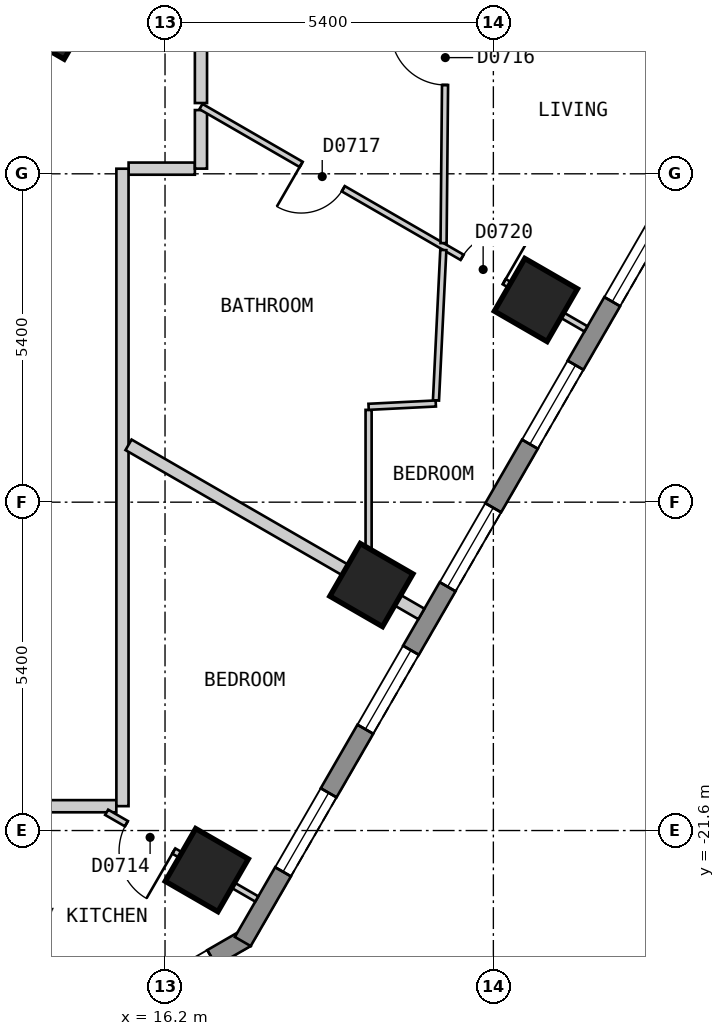
"""IFC4 building model, lengths in metres.
Left out: names, types, materials, properties, quantities, classifications, styles, units other than length and angle.
Written with IfcOpenShell. Run it as: python <this file> out.ifc"""

import sys

from ifc_helpers import new_model, si_unit, direction, frame, frame_2d, origin, origin_2d, place, context, subcontext, project, spatial, polyline, rectangle, outline, extrude, element, fill, save


model = new_model("IFC4")
c1 = context("Model", 3, precision=1e-05, world=origin(), true_north=direction((0.0, 1.0)))
c2 = subcontext(c1, "Body", "Model", "MODEL_VIEW")
j1 = project(units=[si_unit("LENGTHUNIT", "METRE"), si_unit("PLANEANGLEUNIT", "RADIAN")], contexts=[c1])
p1 = place(None, origin())
s1 = spatial("IfcSite", under=j1, at=p1, CompositionType="ELEMENT")
p2 = place(p1, origin())
s2 = spatial("IfcBuilding", under=s1, at=p2, CompositionType="ELEMENT")
p3 = place(p2, frame((0.0, 0.0, 93.0)))
s3 = spatial("IfcBuildingStorey", under=s2, at=p3, CompositionType="ELEMENT", Elevation=93.0)
for number, where, z_axis, x_axis in (
    (1, (16.887, -22.251, 0.0), (0.0, 0.0, 1.0), (0.5, 0.866, 0.0)),
    (2, (19.594, -17.563, 0.0), (0.0, 0.0, 1.0), (0.5, 0.866, 0.0)),
    (3, (22.3, -12.875, 0.0), (0.0, 0.0, 1.0), (0.5, 0.866, 0.0)),
):
    element("IfcColumn", number, at=place(p3, frame(where, z_axis=z_axis, x_axis=x_axis)), inside=s3, PredefinedType="COLUMN", context=c2, shape_type="SweptSolid", body=[
        extrude(rectangle(XDim=1.0, YDim=1.0, at=origin_2d()), origin(), (0.0, 0.0, 1.0), 3.0),
    ])
p4 = place(p3, frame((14.376, -8.3, 0.0), z_axis=(0.0, 0.0, 1.0), x_axis=(0.5, 0.866025403784, 0.0)))
e4 = element("IfcColumn", 4, at=p4, inside=s3, PredefinedType="COLUMN", context=c2, shape_type="SweptSolid", body=[
    extrude(rectangle(XDim=0.9, YDim=0.9, at=origin_2d()), origin(), (0.0, 0.0, 1.0), 3.0),
])
p5 = place(p3, frame((13.204, -25.87, 0.0), z_axis=(0.0, 0.0, 1.0), x_axis=(0.866010750942, 0.50002537861, 0.0)))
e5 = element("IfcWall", 5, at=p5, inside=s3, PredefinedType="SOLIDWALL", context=c2, shape_type="SweptSolid", body=[
    extrude(outline(polyline([(0.0, -0.15), (5.0, -0.15), (4.919, 0.15), (0.08, 0.15), (0.0, -0.15)])), origin(), (0.0, 0.0, 1.0), 2.7),
])
p6 = place(p5, frame((0.65, 0.0, 0.15)))
e6 = element("IfcOpeningElement", 6, at=p6, cuts=e5, PredefinedType="OPENING", context=c2, shape_type="SweptSolid", body=[
    extrude(rectangle(XDim=1.2, YDim=2.1, at=frame_2d((0.6, 1.05))), frame((0.0, 0.16, 0.0), z_axis=(0.0, -1.0, 0.0), x_axis=(1.0, 0.0, 0.0)), (0.0, 0.0, 1.0), 0.32),
])
p7 = place(p5, frame((3.149, 0.0, 0.15)))
e7 = element("IfcOpeningElement", 7, at=p7, cuts=e5, PredefinedType="OPENING", context=c2, shape_type="SweptSolid", body=[
    extrude(rectangle(XDim=1.2, YDim=2.1, at=frame_2d((0.6, 1.05))), frame((0.0, 0.16, 0.0), z_axis=(0.0, -1.0, 0.0), x_axis=(1.0, 0.0, 0.0)), (0.0, 0.0, 1.0), 0.32),
])
p8 = place(p3, frame((17.479, -23.425, 0.0), z_axis=(0.0, 0.0, 1.0), x_axis=(0.500035407905, 0.866004960056, 0.0)))
e8 = element("IfcWall", 8, at=p8, inside=s3, PredefinedType="SOLIDWALL", context=c2, shape_type="SweptSolid", body=[
    extrude(outline(polyline([(0.0, -0.15), (23.094, -0.15), (23.014, 0.15), (0.08, 0.15), (0.0, -0.15)])), origin(), (0.0, 0.0, 1.0), 2.7),
])
p9 = place(p8, frame((1.324, 0.0, 0.15)))
e9 = element("IfcOpeningElement", 9, at=p9, cuts=e8, PredefinedType="OPENING", context=c2, shape_type="SweptSolid", body=[
    extrude(rectangle(XDim=1.5, YDim=2.1, at=frame_2d((0.75, 1.05))), frame((0.0, 0.16, 0.0), z_axis=(0.0, -1.0, 0.0), x_axis=(1.0, 0.0, 0.0)), (0.0, 0.0, 1.0), 0.32),
])
p10 = place(p8, frame((4.031, 0.0, 0.15)))
e10 = element("IfcOpeningElement", 10, at=p10, cuts=e8, PredefinedType="OPENING", context=c2, shape_type="SweptSolid", body=[
    extrude(rectangle(XDim=1.5, YDim=2.1, at=frame_2d((0.75, 1.05))), frame((0.0, 0.16, 0.0), z_axis=(0.0, -1.0, 0.0), x_axis=(1.0, 0.0, 0.0)), (0.0, 0.0, 1.0), 0.32),
])
p11 = place(p8, frame((6.737, 0.0, 0.15)))
e11 = element("IfcOpeningElement", 11, at=p11, cuts=e8, PredefinedType="OPENING", context=c2, shape_type="SweptSolid", body=[
    extrude(rectangle(XDim=1.5, YDim=2.1, at=frame_2d((0.75, 1.05))), frame((0.0, 0.16, 0.0), z_axis=(0.0, -1.0, 0.0), x_axis=(1.0, 0.0, 0.0)), (0.0, 0.0, 1.0), 0.32),
])
p12 = place(p8, frame((9.444, 0.0, 0.15)))
e12 = element("IfcOpeningElement", 12, at=p12, cuts=e8, PredefinedType="OPENING", context=c2, shape_type="SweptSolid", body=[
    extrude(rectangle(XDim=1.5, YDim=2.1, at=frame_2d((0.75, 1.05))), frame((0.0, 0.16, 0.0), z_axis=(0.0, -1.0, 0.0), x_axis=(1.0, 0.0, 0.0)), (0.0, 0.0, 1.0), 0.32),
])
p13 = place(p8, frame((12.151, 0.0, 0.15)))
e13 = element("IfcOpeningElement", 13, at=p13, cuts=e8, PredefinedType="OPENING", context=c2, shape_type="SweptSolid", body=[
    extrude(rectangle(XDim=1.5, YDim=2.1, at=frame_2d((0.75, 1.05))), frame((0.0, 0.16, 0.0), z_axis=(0.0, -1.0, 0.0), x_axis=(1.0, 0.0, 0.0)), (0.0, 0.0, 1.0), 0.32),
])
p14 = place(p8, frame((14.857, 0.0, 0.15)))
e14 = element("IfcOpeningElement", 14, at=p14, cuts=e8, PredefinedType="OPENING", context=c2, shape_type="SweptSolid", body=[
    extrude(rectangle(XDim=1.5, YDim=2.1, at=frame_2d((0.75, 1.05))), frame((0.0, 0.16, 0.0), z_axis=(0.0, -1.0, 0.0), x_axis=(1.0, 0.0, 0.0)), (0.0, 0.0, 1.0), 0.32),
])
p15 = place(p8, frame((17.564, 0.0, 0.15)))
e15 = element("IfcOpeningElement", 15, at=p15, cuts=e8, PredefinedType="OPENING", context=c2, shape_type="SweptSolid", body=[
    extrude(rectangle(XDim=1.5, YDim=2.1, at=frame_2d((0.75, 1.05))), frame((0.0, 0.16, 0.0), z_axis=(0.0, -1.0, 0.0), x_axis=(1.0, 0.0, 0.0)), (0.0, 0.0, 1.0), 0.32),
])
p16 = place(p8, frame((20.271, 0.0, 0.15)))
e16 = element("IfcOpeningElement", 16, at=p16, cuts=e8, PredefinedType="OPENING", context=c2, shape_type="SweptSolid", body=[
    extrude(rectangle(XDim=1.5, YDim=2.1, at=frame_2d((0.75, 1.05))), frame((0.0, 0.16, 0.0), z_axis=(0.0, -1.0, 0.0), x_axis=(1.0, 0.0, 0.0)), (0.0, 0.0, 1.0), 0.32),
])
p17 = place(p3, frame((16.791, -5.985, 0.0), z_axis=(0.0, 0.0, 1.0), x_axis=(0.0, -1.0, 0.0)))
e17 = element("IfcWall", 17, at=p17, inside=s3, PredefinedType="PARTITIONING", context=c2, shape_type="SweptSolid", body=[
    extrude(rectangle(XDim=3.651, YDim=0.2, at=frame_2d((1.825, 0.0))), origin(), (0.0, 0.0, 1.0), 2.7),
])
p18 = place(p17, frame((0.183, 0.0, 0.0)))
e18 = element("IfcOpeningElement", 18, at=p18, cuts=e17, PredefinedType="OPENING", context=c2, shape_type="SweptSolid", body=[
    extrude(rectangle(XDim=1.0, YDim=2.1, at=frame_2d((0.5, 1.05))), frame((0.0, 0.11, 0.0), z_axis=(0.0, -1.0, 0.0), x_axis=(1.0, 0.0, 0.0)), (0.0, 0.0, 1.0), 0.22),
])
p19 = place(p3, frame((15.601, -10.715, 0.0), z_axis=(0.0, 0.0, 1.0), x_axis=(1.0, 0.0, 0.0)))
e19 = element("IfcWall", 19, at=p19, inside=s3, PredefinedType="PARTITIONING", context=c2, shape_type="SweptSolid", body=[
    extrude(rectangle(XDim=1.09, YDim=0.2, at=frame_2d((0.545, 0.0))), origin(), (0.0, 0.0, 1.0), 2.7),
])
p20 = place(p3, frame((-15.499, -21.2, 0.0), z_axis=(0.0, 0.0, 1.0), x_axis=(1.0, 0.0, 0.0)))
e20 = element("IfcWall", 20, at=p20, inside=s3, PredefinedType="PARTITIONING", context=c2, shape_type="SweptSolid", body=[
    extrude(rectangle(XDim=30.898, YDim=0.2, at=frame_2d((15.449, 0.0))), origin(), (0.0, 0.0, 1.0), 2.7),
])
p21 = place(p20, frame((9.977, 0.0, 0.0)))
e21 = element("IfcOpeningElement", 21, at=p21, cuts=e20, PredefinedType="OPENING", context=c2, shape_type="SweptSolid", body=[
    extrude(rectangle(XDim=1.0, YDim=2.1, at=frame_2d((0.5, 1.05))), frame((0.0, 0.11, 0.0), z_axis=(0.0, -1.0, 0.0), x_axis=(1.0, 0.0, 0.0)), (0.0, 0.0, 1.0), 0.22),
])
p22 = place(p20, frame((25.046, 0.0, 0.0)))
e22 = element("IfcOpeningElement", 22, at=p22, cuts=e20, PredefinedType="OPENING", context=c2, shape_type="SweptSolid", body=[
    extrude(rectangle(XDim=1.0, YDim=2.1, at=frame_2d((0.5, 1.05))), frame((0.0, 0.11, 0.0), z_axis=(0.0, -1.0, 0.0), x_axis=(1.0, 0.0, 0.0)), (0.0, 0.0, 1.0), 0.22),
])
p23 = place(p3, frame((15.5, -21.199, 0.0), z_axis=(0.0, 0.0, 1.0), x_axis=(0.0, 1.0, 0.0)))
e23 = element("IfcWall", 23, at=p23, inside=s3, PredefinedType="PARTITIONING", context=c2, shape_type="SweptSolid", body=[
    extrude(rectangle(XDim=10.483, YDim=0.2, at=frame_2d((5.241, 0.0))), origin(), (0.0, 0.0, 1.0), 2.7),
])
p24 = place(p3, frame((16.791, -10.715, 0.0), z_axis=(0.0, 0.0, 1.0), x_axis=(0.0, 1.0, 0.0)))
e24 = element("IfcWall", 24, at=p24, inside=s3, PredefinedType="PARTITIONING", context=c2, shape_type="SweptSolid", body=[
    extrude(rectangle(XDim=0.963, YDim=0.2, at=frame_2d((0.481, 0.0))), origin(), (0.0, 0.0, 1.0), 2.7),
])
p25 = place(p3, frame((15.24, -21.3, 0.0), z_axis=(0.0, 0.0, 1.0), x_axis=(0.866090043625, -0.499888023795, 0.0)))
e25 = element("IfcWall", 25, at=p25, inside=s3, PredefinedType="PARTITIONING", context=c2, shape_type="SweptSolid", body=[
    extrude(rectangle(XDim=2.851, YDim=0.1, at=frame_2d((1.425, 0.0))), origin(), (0.0, 0.0, 1.0), 2.7),
])
p26 = place(p25, frame((0.375, 0.0, 0.0)))
e26 = element("IfcOpeningElement", 26, at=p26, cuts=e25, PredefinedType="OPENING", context=c2, shape_type="SweptSolid", body=[
    extrude(rectangle(XDim=0.9, YDim=2.1, at=frame_2d((0.45, 1.05))), frame((0.0, 0.06, 0.0), z_axis=(0.0, -1.0, 0.0), x_axis=(1.0, 0.0, 0.0)), (0.0, 0.0, 1.0), 0.12),
])
p27 = place(p3, frame((16.791, -9.694, 0.0), z_axis=(0.0, 0.0, 1.0), x_axis=(0.866013208994, -0.500021121402, 0.0)))
e27 = element("IfcWall", 27, at=p27, inside=s3, PredefinedType="PARTITIONING", context=c2, shape_type="SweptSolid", body=[
    extrude(rectangle(XDim=7.312, YDim=0.1, at=frame_2d((3.656, 0.0))), origin(), (0.0, 0.0, 1.0), 2.7),
])
p28 = place(p27, frame((1.903, 0.0, 0.0)))
e28 = element("IfcOpeningElement", 28, at=p28, cuts=e27, PredefinedType="OPENING", context=c2, shape_type="SweptSolid", body=[
    extrude(rectangle(XDim=0.8, YDim=2.1, at=frame_2d((0.4, 1.05))), frame((0.0, 0.06, 0.0), z_axis=(0.0, -1.0, 0.0), x_axis=(1.0, 0.0, 0.0)), (0.0, 0.0, 1.0), 0.12),
])
p29 = place(p27, frame((4.959, 0.0, 0.0)))
e29 = element("IfcOpeningElement", 29, at=p29, cuts=e27, PredefinedType="OPENING", context=c2, shape_type="SweptSolid", body=[
    extrude(rectangle(XDim=0.8, YDim=2.1, at=frame_2d((0.4, 1.05))), frame((0.0, 0.06, 0.0), z_axis=(0.0, -1.0, 0.0), x_axis=(1.0, 0.0, 0.0)), (0.0, 0.0, 1.0), 0.12),
])
p30 = place(p3, frame((20.656, -14.527, 0.0), z_axis=(0.0, 0.0, 1.0), x_axis=(0.048885629948, 0.998804382842, 0.0)))
e30 = element("IfcWall", 30, at=p30, inside=s3, PredefinedType="PARTITIONING", context=c2, shape_type="SweptSolid", body=[
    extrude(rectangle(XDim=2.477, YDim=0.1, at=frame_2d((1.239, 0.0))), origin(), (0.0, 0.0, 1.0), 2.7),
])
p31 = place(p3, frame((20.781, -11.94, 0.0), z_axis=(0.0, 0.0, 1.0), x_axis=(0.009329670416, 0.999956477678, 0.0)))
e31 = element("IfcWall", 31, at=p31, inside=s3, PredefinedType="PARTITIONING", context=c2, shape_type="SweptSolid", body=[
    extrude(rectangle(XDim=6.097, YDim=0.1, at=frame_2d((3.049, 0.0))), origin(), (0.0, 0.0, 1.0), 2.7),
])
p32 = place(p31, frame((2.601, 0.0, 0.0)))
e32 = element("IfcOpeningElement", 32, at=p32, cuts=e31, PredefinedType="OPENING", context=c2, shape_type="SweptSolid", body=[
    extrude(rectangle(XDim=0.9, YDim=2.1, at=frame_2d((0.45, 1.05))), frame((0.0, 0.06, 0.0), z_axis=(0.0, -1.0, 0.0), x_axis=(1.0, 0.0, 0.0)), (0.0, 0.0, 1.0), 0.12),
])
p33 = place(p3, frame((19.548, -17.421, 0.0), z_axis=(0.0, 0.0, 1.0), x_axis=(0.0, 1.0, 0.0)))
e33 = element("IfcWall", 33, at=p33, inside=s3, PredefinedType="PARTITIONING", context=c2, shape_type="SweptSolid", body=[
    extrude(rectangle(XDim=2.739, YDim=0.1, at=frame_2d((1.37, 0.0))), origin(), (0.0, 0.0, 1.0), 2.7),
])
p34 = place(p3, frame((19.548, -14.632, 0.0), z_axis=(0.0, 0.0, 1.0), x_axis=(0.998755638501, 0.049871580712, 0.0)))
e34 = element("IfcWall", 34, at=p34, inside=s3, PredefinedType="PARTITIONING", context=c2, shape_type="SweptSolid", body=[
    extrude(rectangle(XDim=1.106, YDim=0.1, at=frame_2d((0.553, 0.0))), origin(), (0.0, 0.0, 1.0), 2.7),
])
p35 = place(p3, frame((15.6, -15.257, 0.0), z_axis=(0.0, 0.0, 1.0), x_axis=(0.86598379672, -0.500072058625, 0.0)))
e35 = element("IfcWall", 35, at=p35, inside=s3, PredefinedType="PARTITIONING", context=c2, shape_type="SweptSolid", body=[
    extrude(rectangle(XDim=5.561, YDim=0.2, at=frame_2d((2.781, 0.0))), origin(), (0.0, 0.0, 1.0), 2.7),
])
p36 = place(p7, origin())
e36 = element("IfcWindow", 36, at=p36, inside=s3, PartitioningType="SINGLE_PANEL", PredefinedType="WINDOW", context=c2, shape_type="SweptSolid", body=[
    extrude(rectangle(XDim=1.2, YDim=2.1, at=frame_2d((0.6, 1.05))), frame((0.0, 0.03, 0.0), z_axis=(0.0, -1.0, 0.0), x_axis=(1.0, 0.0, 0.0)), (0.0, 0.0, 1.0), 0.06),
])
fill(e7, e36)
p37 = place(p9, origin())
e37 = element("IfcWindow", 37, at=p37, inside=s3, PartitioningType="SINGLE_PANEL", PredefinedType="WINDOW", context=c2, shape_type="SweptSolid", body=[
    extrude(rectangle(XDim=1.5, YDim=2.1, at=frame_2d((0.75, 1.05))), frame((0.0, 0.03, 0.0), z_axis=(0.0, -1.0, 0.0), x_axis=(1.0, 0.0, 0.0)), (0.0, 0.0, 1.0), 0.06),
])
fill(e9, e37)
p38 = place(p10, origin())
e38 = element("IfcWindow", 38, at=p38, inside=s3, PartitioningType="SINGLE_PANEL", PredefinedType="WINDOW", context=c2, shape_type="SweptSolid", body=[
    extrude(rectangle(XDim=1.5, YDim=2.1, at=frame_2d((0.75, 1.05))), frame((0.0, 0.03, 0.0), z_axis=(0.0, -1.0, 0.0), x_axis=(1.0, 0.0, 0.0)), (0.0, 0.0, 1.0), 0.06),
])
fill(e10, e38)
p39 = place(p11, origin())
e39 = element("IfcWindow", 39, at=p39, inside=s3, PartitioningType="SINGLE_PANEL", PredefinedType="WINDOW", context=c2, shape_type="SweptSolid", body=[
    extrude(rectangle(XDim=1.5, YDim=2.1, at=frame_2d((0.75, 1.05))), frame((0.0, 0.03, 0.0), z_axis=(0.0, -1.0, 0.0), x_axis=(1.0, 0.0, 0.0)), (0.0, 0.0, 1.0), 0.06),
])
fill(e11, e39)
p40 = place(p12, origin())
e40 = element("IfcWindow", 40, at=p40, inside=s3, PartitioningType="SINGLE_PANEL", PredefinedType="WINDOW", context=c2, shape_type="SweptSolid", body=[
    extrude(rectangle(XDim=1.5, YDim=2.1, at=frame_2d((0.75, 1.05))), frame((0.0, 0.03, 0.0), z_axis=(0.0, -1.0, 0.0), x_axis=(1.0, 0.0, 0.0)), (0.0, 0.0, 1.0), 0.06),
])
fill(e12, e40)
p41 = place(p13, origin())
e41 = element("IfcWindow", 41, at=p41, inside=s3, PartitioningType="SINGLE_PANEL", PredefinedType="WINDOW", context=c2, shape_type="SweptSolid", body=[
    extrude(rectangle(XDim=1.5, YDim=2.1, at=frame_2d((0.75, 1.05))), frame((0.0, 0.03, 0.0), z_axis=(0.0, -1.0, 0.0), x_axis=(1.0, 0.0, 0.0)), (0.0, 0.0, 1.0), 0.06),
])
fill(e13, e41)
p42 = place(p26, origin())
e42 = element("IfcDoor", 42, at=p42, inside=s3, OperationType="SINGLE_SWING_RIGHT", PredefinedType="DOOR", context=c2, shape_type="SweptSolid", body=[
    extrude(rectangle(XDim=0.9, YDim=2.1, at=frame_2d((0.45, 1.05))), frame((0.0, 0.025, 0.0), z_axis=(0.0, -1.0, 0.0), x_axis=(1.0, 0.0, 0.0)), (0.0, 0.0, 1.0), 0.05),
])
fill(e26, e42)
p43 = place(p32, origin())
e43 = element("IfcDoor", 43, at=p43, inside=s3, OperationType="SINGLE_SWING_RIGHT", PredefinedType="DOOR", context=c2, shape_type="SweptSolid", body=[
    extrude(rectangle(XDim=0.9, YDim=2.1, at=frame_2d((0.45, 1.05))), frame((0.0, 0.025, 0.0), z_axis=(0.0, -1.0, 0.0), x_axis=(1.0, 0.0, 0.0)), (0.0, 0.0, 1.0), 0.05),
])
fill(e32, e43)
p44 = place(p28, origin())
e44 = element("IfcDoor", 44, at=p44, inside=s3, OperationType="SINGLE_SWING_LEFT", PredefinedType="DOOR", context=c2, shape_type="SweptSolid", body=[
    extrude(rectangle(XDim=0.8, YDim=2.1, at=frame_2d((0.4, 1.05))), frame((0.0, 0.025, 0.0), z_axis=(0.0, -1.0, 0.0), x_axis=(1.0, 0.0, 0.0)), (0.0, 0.0, 1.0), 0.05),
])
fill(e28, e44)
p45 = place(p29, origin())
e45 = element("IfcDoor", 45, at=p45, inside=s3, OperationType="SINGLE_SWING_RIGHT", PredefinedType="DOOR", context=c2, shape_type="SweptSolid", body=[
    extrude(rectangle(XDim=0.8, YDim=2.1, at=frame_2d((0.4, 1.05))), frame((0.0, 0.025, 0.0), z_axis=(0.0, -1.0, 0.0), x_axis=(1.0, 0.0, 0.0)), (0.0, 0.0, 1.0), 0.05),
])
fill(e29, e45)
save(model, sys.argv[1])
